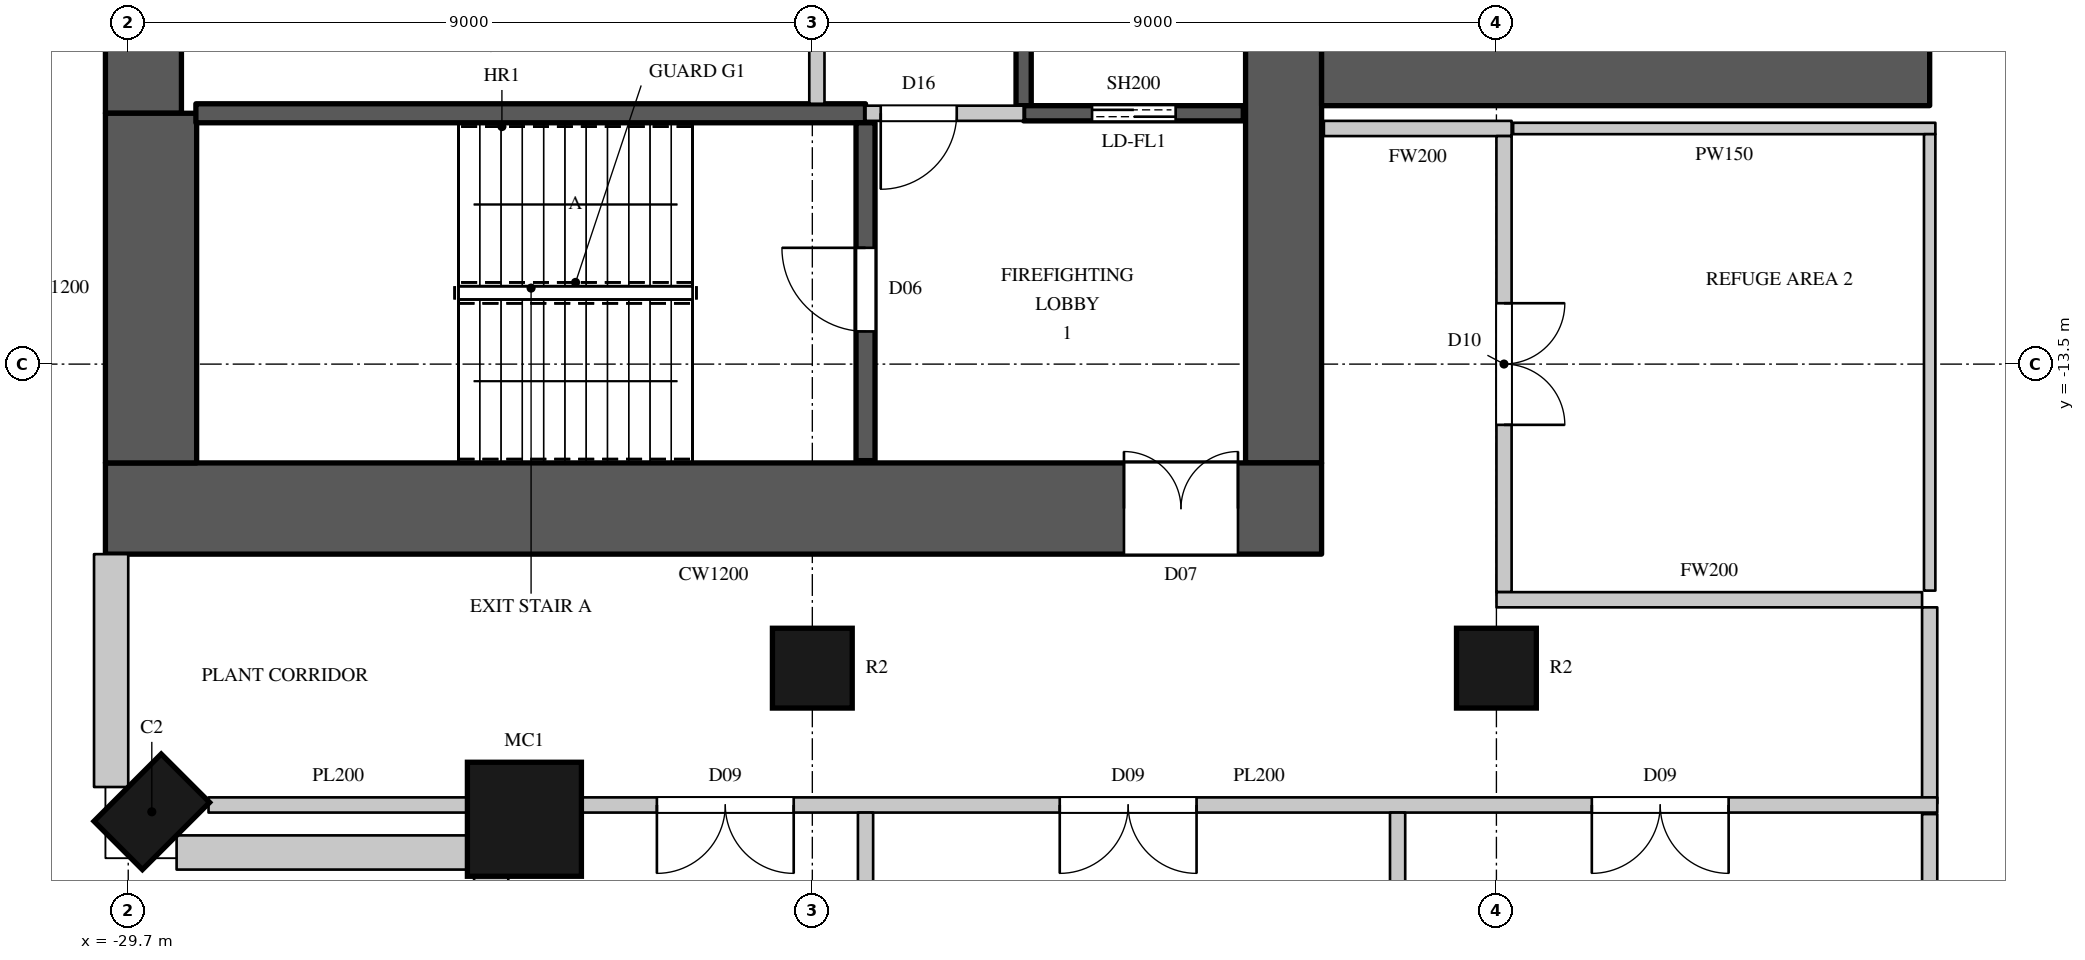
"""IFC4 building model, lengths in metres.
Left out: names, types, materials, properties, quantities, classifications, styles, units other than length and angle.
Written with IfcOpenShell. Run it as: python <this file> out.ifc"""

import sys

from ifc_helpers import new_model, si_unit, direction, frame, frame_2d, origin, origin_2d, place, context, subcontext, project, spatial, rectangle, circle, extrude, element, fill, save


model = new_model("IFC4")
c1 = context("Model", 3, precision=1e-05, world=origin(), true_north=direction((0.0, 1.0)))
c2 = subcontext(c1, "Body", "Model", "MODEL_VIEW")
j1 = project(units=[si_unit("LENGTHUNIT", "METRE"), si_unit("PLANEANGLEUNIT", "RADIAN")], contexts=[c1])
p1 = place(None, origin())
s1 = spatial("IfcSite", under=j1, at=p1, CompositionType="ELEMENT")
p2 = place(p1, origin())
s2 = spatial("IfcBuilding", under=s1, at=p2, CompositionType="ELEMENT")
p3 = place(p2, frame((0.0, 0.0, 152.5)))
s3 = spatial("IfcBuildingStorey", under=s2, at=p3, CompositionType="ELEMENT", Elevation=152.5)
p4 = place(p3, frame((-29.39, -19.39, 0.0), z_axis=(0.0, 0.0, 1.0), x_axis=(0.707106781187, -0.707106781187, 0.0)))
e1 = element("IfcColumn", 1, at=p4, inside=s3, PredefinedType="COLUMN", context=c2, shape_type="SweptSolid", body=[
    extrude(rectangle(XDim=0.9, YDim=1.25, at=origin_2d()), origin(), (0.0, 0.0, 1.0), 8.0),
])
p5 = place(p3, frame((-24.488, -19.488, 0.0), z_axis=(0.0, 0.0, 1.0), x_axis=(1.0, 0.0, 0.0)))
e2 = element("IfcColumn", 2, at=p5, inside=s3, PredefinedType="COLUMN", context=c2, shape_type="SweptSolid", body=[
    extrude(circle(Radius=0.75, at=origin_2d()), origin(), (0.0, 0.0, 1.0), 8.0),
])
for number, where, z_axis, x_axis in (
    (3, (-20.7, -17.5, 0.0), (0.0, 0.0, 1.0), (1.0, 0.0, 0.0)),
    (4, (-11.7, -17.5, 0.0), (0.0, 0.0, 1.0), (1.0, 0.0, 0.0)),
):
    element("IfcColumn", number, at=place(p3, frame(where, z_axis=z_axis, x_axis=x_axis)), inside=s3, PredefinedType="COLUMN", context=c2, shape_type="SweptSolid", body=[
        extrude(circle(Radius=0.525, at=origin_2d()), origin(), (0.0, 0.0, 1.0), 8.0),
    ])
p6 = place(p3, frame((-14.0, -9.6, 0.0), z_axis=(0.0, 0.0, 1.0), x_axis=(1.0, 0.0, 0.0)))
e5 = element("IfcWall", 5, at=p6, inside=s3, PredefinedType="SOLIDWALL", context=c2, shape_type="SweptSolid", body=[
    extrude(rectangle(XDim=8.0, YDim=1.0, at=frame_2d((4.0, 0.0))), origin(), (0.0, 0.0, 1.0), 7.7),
])
p7 = place(p3, frame((-29.925, -16.0, 0.0), z_axis=(0.0, 0.0, 1.0), x_axis=(0.0, -1.0, 0.0)))
e6 = element("IfcWall", 6, at=p7, inside=s3, PredefinedType="SOLIDWALL", context=c2, shape_type="SweptSolid", body=[
    extrude(rectangle(XDim=3.064, YDim=0.45, at=frame_2d((1.532, 0.0))), origin(), (0.0, 0.0, 1.0), 6.4),
])
p8 = place(p3, frame((-29.064, -19.925, 0.0), z_axis=(0.0, 0.0, 1.0), x_axis=(1.0, 0.0, 0.0)))
e7 = element("IfcWall", 7, at=p8, inside=s3, PredefinedType="SOLIDWALL", context=c2, shape_type="SweptSolid", body=[
    extrude(rectangle(XDim=3.857, YDim=0.45, at=frame_2d((1.928, 0.0))), origin(), (0.0, 0.0, 1.0), 7.7),
])
p9 = place(p3, frame((-24.925, -20.207, 0.0), z_axis=(0.0, 0.0, 1.0), x_axis=(0.0, -1.0, 0.0)))
e8 = element("IfcWall", 8, at=p9, inside=s3, PredefinedType="SOLIDWALL", context=c2, shape_type="SweptSolid", body=[
    extrude(rectangle(XDim=1.843, YDim=0.45, at=frame_2d((0.921, 0.0))), origin(), (0.0, 0.0, 1.0), 7.7),
])
p10 = place(p3, frame((-30.0, -15.4, 0.0), z_axis=(0.0, 0.0, 1.0), x_axis=(1.0, 0.0, 0.0)))
e9 = element("IfcWall", 9, at=p10, inside=s3, PredefinedType="SHEAR", context=c2, shape_type="SweptSolid", body=[
    extrude(rectangle(XDim=16.0, YDim=1.2, at=frame_2d((8.0, 0.0))), origin(), (0.0, 0.0, 1.0), 8.0),
])
p11 = place(p10, frame((13.4, 0.0, 0.0)))
e10 = element("IfcOpeningElement", 10, at=p11, cuts=e9, PredefinedType="OPENING", context=c2, shape_type="SweptSolid", body=[
    extrude(rectangle(XDim=1.5, YDim=2.4, at=frame_2d((0.75, 1.2))), frame((0.0, 0.61, 0.0), z_axis=(0.0, -1.0, 0.0), x_axis=(1.0, 0.0, 0.0)), (0.0, 0.0, 1.0), 1.22),
])
p12 = place(p3, frame((-14.5, -14.8, 0.0), z_axis=(0.0, 0.0, 1.0), x_axis=(0.0, 1.0, 0.0)))
e11 = element("IfcWall", 11, at=p12, inside=s3, PredefinedType="SHEAR", context=c2, shape_type="SweptSolid", body=[
    extrude(rectangle(XDim=29.6, YDim=1.0, at=frame_2d((14.8, 0.0))), origin(), (0.0, 0.0, 1.0), 8.0),
])
p13 = place(p12, frame((8.45, 0.0, 0.0)))
e12 = element("IfcOpeningElement", 12, at=p13, cuts=e11, PredefinedType="OPENING", context=c2, shape_type="SweptSolid", body=[
    extrude(rectangle(XDim=1.5, YDim=2.4, at=frame_2d((0.75, 1.2))), frame((0.0, 0.51, 0.0), z_axis=(0.0, -1.0, 0.0), x_axis=(1.0, 0.0, 0.0)), (0.0, 0.0, 1.0), 1.02),
])
p14 = place(p12, frame((19.65, 0.0, 0.0)))
e13 = element("IfcOpeningElement", 13, at=p14, cuts=e11, PredefinedType="OPENING", context=c2, shape_type="SweptSolid", body=[
    extrude(rectangle(XDim=1.5, YDim=2.4, at=frame_2d((0.75, 1.2))), frame((0.0, 0.51, 0.0), z_axis=(0.0, -1.0, 0.0), x_axis=(1.0, 0.0, 0.0)), (0.0, 0.0, 1.0), 1.02),
])
p15 = place(p12, frame((14.5, 0.0, 0.0)))
e14 = element("IfcOpeningElement", 14, at=p15, cuts=e11, PredefinedType="OPENING", context=c2, shape_type="SweptSolid", body=[
    extrude(rectangle(XDim=0.6, YDim=2.0, at=frame_2d((0.3, 1.0))), frame((0.0, 0.51, 0.0), z_axis=(0.0, -1.0, 0.0), x_axis=(1.0, 0.0, 0.0)), (0.0, 0.0, 1.0), 1.02),
])
p16 = place(p3, frame((-29.5, -10.2, 0.0), z_axis=(0.0, 0.0, 1.0), x_axis=(0.0, 1.0, 0.0)))
e15 = element("IfcWall", 15, at=p16, inside=s3, PredefinedType="SHEAR", context=c2, shape_type="SweptSolid", body=[
    extrude(rectangle(XDim=20.4, YDim=1.0, at=frame_2d((10.2, 0.0))), origin(), (0.0, 0.0, 1.0), 8.0),
])
p17 = place(p3, frame((-29.4, -14.8, 0.0), z_axis=(0.0, 0.0, 1.0), x_axis=(0.0, 1.0, 0.0)))
e16 = element("IfcWall", 16, at=p17, inside=s3, PredefinedType="SHEAR", context=c2, shape_type="SweptSolid", body=[
    extrude(rectangle(XDim=4.6, YDim=1.2, at=frame_2d((2.3, 0.0))), origin(), (0.0, 0.0, 1.0), 8.0),
])
p18 = place(p3, frame((-20.0, -10.2, 0.0), z_axis=(0.0, 0.0, 1.0), x_axis=(1.0, 0.0, 0.0)))
e17 = element("IfcWall", 17, at=p18, inside=s3, PredefinedType="PARTITIONING", context=c2, shape_type="SweptSolid", body=[
    extrude(rectangle(XDim=2.08, YDim=0.2, at=frame_2d((1.04, 0.0))), origin(), (0.0, 0.0, 1.0), 7.7),
])
p19 = place(p18, frame((0.2, 0.0, 0.0)))
e18 = element("IfcOpeningElement", 18, at=p19, cuts=e17, PredefinedType="OPENING", context=c2, shape_type="SweptSolid", body=[
    extrude(rectangle(XDim=1.0, YDim=2.2, at=frame_2d((0.5, 1.1))), frame((0.0, 0.11, 0.0), z_axis=(0.0, -1.0, 0.0), x_axis=(1.0, 0.0, 0.0)), (0.0, 0.0, 1.0), 0.22),
])
p20 = place(p3, frame((-13.97, -10.4, 0.0), z_axis=(0.0, 0.0, 1.0), x_axis=(1.0, 0.0, 0.0)))
e19 = element("IfcWall", 19, at=p20, inside=s3, PredefinedType="PARTITIONING", context=c2, shape_type="SweptSolid", body=[
    extrude(rectangle(XDim=2.47, YDim=0.2, at=frame_2d((1.235, 0.0))), origin(), (0.0, 0.0, 1.0), 7.7),
])
p21 = place(p3, frame((-11.6, -16.499, 0.0), z_axis=(0.0, 0.0, 1.0), x_axis=(0.0, 1.0, 0.0)))
e20 = element("IfcWall", 20, at=p21, inside=s3, PredefinedType="PARTITIONING", context=c2, shape_type="SweptSolid", body=[
    extrude(rectangle(XDim=5.999, YDim=0.2, at=frame_2d((3.0, 0.0))), origin(), (0.0, 0.0, 1.0), 6.4),
])
p22 = place(p21, frame((2.2, 0.0, 0.0)))
e21 = element("IfcOpeningElement", 21, at=p22, cuts=e20, PredefinedType="OPENING", context=c2, shape_type="SweptSolid", body=[
    extrude(rectangle(XDim=1.6, YDim=2.4, at=frame_2d((0.8, 1.2))), frame((0.0, 0.11, 0.0), z_axis=(0.0, -1.0, 0.0), x_axis=(1.0, 0.0, 0.0)), (0.0, 0.0, 1.0), 0.22),
])
p23 = place(p3, frame((-11.699, -16.6, 0.0), z_axis=(0.0, 0.0, 1.0), x_axis=(1.0, 0.0, 0.0)))
e22 = element("IfcWall", 22, at=p23, inside=s3, PredefinedType="PARTITIONING", context=c2, shape_type="SweptSolid", body=[
    extrude(rectangle(XDim=5.599, YDim=0.2, at=frame_2d((2.799, 0.0))), origin(), (0.0, 0.0, 1.0), 5.85),
])
p24 = place(p3, frame((-6.0, -19.28, 0.0), z_axis=(0.0, 0.0, 1.0), x_axis=(0.0, 1.0, 0.0)))
e23 = element("IfcWall", 23, at=p24, inside=s3, PredefinedType="PARTITIONING", context=c2, shape_type="SweptSolid", body=[
    extrude(rectangle(XDim=2.58, YDim=0.2, at=frame_2d((1.29, 0.0))), origin(), (0.0, 0.0, 1.0), 7.7),
])
p25 = place(p3, frame((-11.48, -10.4, 0.0), z_axis=(0.0, 0.0, 1.0), x_axis=(1.0, 0.0, 0.0)))
e24 = element("IfcWall", 24, at=p25, inside=s3, PredefinedType="PARTITIONING", context=c2, shape_type="SweptSolid", body=[
    extrude(rectangle(XDim=5.555, YDim=0.15, at=frame_2d((2.777, 0.0))), origin(), (0.0, 0.0, 1.0), 7.7),
])
p26 = place(p3, frame((-6.0, -16.48, 0.0), z_axis=(0.0, 0.0, 1.0), x_axis=(0.0, 1.0, 0.0)))
e25 = element("IfcWall", 25, at=p26, inside=s3, PredefinedType="PARTITIONING", context=c2, shape_type="SweptSolid", body=[
    extrude(rectangle(XDim=6.005, YDim=0.15, at=frame_2d((3.002, 0.0))), origin(), (0.0, 0.0, 1.0), 7.7),
])
p27 = place(p3, frame((-28.644, -19.3, 0.0), z_axis=(0.0, 0.0, 1.0), x_axis=(1.0, 0.0, 0.0)))
e26 = element("IfcWall", 26, at=p27, inside=s3, PredefinedType="PARTITIONING", context=c2, shape_type="SweptSolid", body=[
    extrude(rectangle(XDim=3.413, YDim=0.2, at=frame_2d((1.706, 0.0))), origin(), (0.0, 0.0, 1.0), 7.7),
])
p28 = place(p3, frame((-23.745, -19.3, 0.0), z_axis=(0.0, 0.0, 1.0), x_axis=(1.0, 0.0, 0.0)))
e27 = element("IfcWall", 27, at=p28, inside=s3, PredefinedType="PARTITIONING", context=c2, shape_type="SweptSolid", body=[
    extrude(rectangle(XDim=17.845, YDim=0.2, at=frame_2d((8.922, 0.0))), origin(), (0.0, 0.0, 1.0), 7.25),
])
p29 = place(p28, frame((1.0, 0.0, 0.0)))
e28 = element("IfcOpeningElement", 28, at=p29, cuts=e27, PredefinedType="OPENING", context=c2, shape_type="SweptSolid", body=[
    extrude(rectangle(XDim=1.8, YDim=2.4, at=frame_2d((0.9, 1.2))), frame((0.0, 0.11, 0.0), z_axis=(0.0, -1.0, 0.0), x_axis=(1.0, 0.0, 0.0)), (0.0, 0.0, 1.0), 0.22),
])
p30 = place(p28, frame((6.3, 0.0, 0.0)))
e29 = element("IfcOpeningElement", 29, at=p30, cuts=e27, PredefinedType="OPENING", context=c2, shape_type="SweptSolid", body=[
    extrude(rectangle(XDim=1.8, YDim=2.4, at=frame_2d((0.9, 1.2))), frame((0.0, 0.11, 0.0), z_axis=(0.0, -1.0, 0.0), x_axis=(1.0, 0.0, 0.0)), (0.0, 0.0, 1.0), 0.22),
])
p31 = place(p28, frame((13.3, 0.0, 0.0)))
e30 = element("IfcOpeningElement", 30, at=p31, cuts=e27, PredefinedType="OPENING", context=c2, shape_type="SweptSolid", body=[
    extrude(rectangle(XDim=1.8, YDim=2.4, at=frame_2d((0.9, 1.2))), frame((0.0, 0.11, 0.0), z_axis=(0.0, -1.0, 0.0), x_axis=(1.0, 0.0, 0.0)), (0.0, 0.0, 1.0), 0.22),
])
p32 = place(p3, frame((-20.64, -10.075, 0.0), z_axis=(0.0, 0.0, 1.0), x_axis=(0.0, 1.0, 0.0)))
e31 = element("IfcWall", 31, at=p32, inside=s3, PredefinedType="PARTITIONING", context=c2, shape_type="SweptSolid", body=[
    extrude(rectangle(XDim=2.575, YDim=0.2, at=frame_2d((1.288, 0.0))), origin(), (0.0, 0.0, 1.0), 7.7),
])
for number, where, z_axis, x_axis in (
    (32, (-20.0, -25.7, 0.0), (0.0, 0.0, 1.0), (0.0, 1.0, 0.0)),
    (33, (-13.0, -25.7, 0.0), (0.0, 0.0, 1.0), (0.0, 1.0, 0.0)),
):
    element("IfcWall", number, at=place(p3, frame(where, z_axis=z_axis, x_axis=x_axis)), inside=s3, PredefinedType="PARTITIONING", context=c2, shape_type="SweptSolid", body=[
        extrude(rectangle(XDim=6.3, YDim=0.2, at=frame_2d((3.15, 0.0))), origin(), (0.0, 0.0, 1.0), 7.7),
    ])
p33 = place(p3, frame((-6.0, -25.7, 0.0), z_axis=(0.0, 0.0, 1.0), x_axis=(0.0, 1.0, 0.0)))
e34 = element("IfcWall", 34, at=p33, inside=s3, PredefinedType="PARTITIONING", context=c2, shape_type="SweptSolid", body=[
    extrude(rectangle(XDim=6.28, YDim=0.2, at=frame_2d((3.14, 0.0))), origin(), (0.0, 0.0, 1.0), 7.7),
])
p34 = place(p3, frame((-17.92, -10.1, 0.0), z_axis=(0.0, 0.0, 1.0), x_axis=(0.0, 1.0, 0.0)))
e35 = element("IfcWall", 35, at=p34, inside=s3, PredefinedType="SHEAR", context=c2, shape_type="SweptSolid", body=[
    extrude(rectangle(XDim=2.6, YDim=0.2, at=frame_2d((1.3, 0.0))), origin(), (0.0, 0.0, 1.0), 7.7),
])
p35 = place(p3, frame((-17.92, -10.2, 0.0), z_axis=(0.0, 0.0, 1.0), x_axis=(1.0, 0.0, 0.0)))
e36 = element("IfcWall", 36, at=p35, inside=s3, PredefinedType="SHEAR", context=c2, shape_type="SweptSolid", body=[
    extrude(rectangle(XDim=2.89, YDim=0.2, at=frame_2d((1.445, 0.0))), origin(), (0.0, 0.0, 1.0), 7.7),
])
p36 = place(p35, frame((0.9, 0.0, 0.0)))
e37 = element("IfcOpeningElement", 37, at=p36, cuts=e36, PredefinedType="OPENING", context=c2, shape_type="SweptSolid", body=[
    extrude(rectangle(XDim=1.1, YDim=2.2, at=frame_2d((0.55, 1.1))), frame((0.0, 0.11, 0.0), z_axis=(0.0, -1.0, 0.0), x_axis=(1.0, 0.0, 0.0)), (0.0, 0.0, 1.0), 0.22),
])
p37 = place(p3, frame((-28.81, -10.2, 0.0), z_axis=(0.0, 0.0, 1.0), x_axis=(1.0, 0.0, 0.0)))
e38 = element("IfcWall", 38, at=p37, inside=s3, PredefinedType="SHEAR", context=c2, shape_type="SweptSolid", body=[
    extrude(rectangle(XDim=8.81, YDim=0.25, at=frame_2d((4.405, 0.0))), origin(), (0.0, 0.0, 1.0), 7.7),
])
p38 = place(p3, frame((-20.0, -14.77, 0.0), z_axis=(0.0, 0.0, 1.0), x_axis=(0.0, 1.0, 0.0)))
e39 = element("IfcWall", 39, at=p38, inside=s3, PredefinedType="SHEAR", context=c2, shape_type="SweptSolid", body=[
    extrude(rectangle(XDim=4.445, YDim=0.25, at=frame_2d((2.223, 0.0))), origin(), (0.0, 0.0, 1.0), 7.7),
])
p39 = place(p38, frame((1.7, 0.0, 0.0)))
e40 = element("IfcOpeningElement", 40, at=p39, cuts=e39, PredefinedType="OPENING", context=c2, shape_type="SweptSolid", body=[
    extrude(rectangle(XDim=1.1, YDim=2.2, at=frame_2d((0.55, 1.1))), frame((0.0, 0.135, 0.0), z_axis=(0.0, -1.0, 0.0), x_axis=(1.0, 0.0, 0.0)), (0.0, 0.0, 1.0), 0.27),
])
p40 = place(p39, origin())
e41 = element("IfcDoor", 41, at=p40, inside=s3, OperationType="SINGLE_SWING_RIGHT", PredefinedType="DOOR", context=c2, shape_type="SweptSolid", body=[
    extrude(rectangle(XDim=1.1, YDim=2.2, at=frame_2d((0.55, 1.1))), frame((0.0, 0.025, 0.0), z_axis=(0.0, -1.0, 0.0), x_axis=(1.0, 0.0, 0.0)), (0.0, 0.0, 1.0), 0.05),
])
fill(e40, e41)
p41 = place(p19, origin())
e42 = element("IfcDoor", 42, at=p41, inside=s3, OperationType="SINGLE_SWING_RIGHT", PredefinedType="DOOR", context=c2, shape_type="SweptSolid", body=[
    extrude(rectangle(XDim=1.0, YDim=2.2, at=frame_2d((0.5, 1.1))), frame((0.0, 0.025, 0.0), z_axis=(0.0, -1.0, 0.0), x_axis=(1.0, 0.0, 0.0)), (0.0, 0.0, 1.0), 0.05),
])
fill(e18, e42)
p42 = place(p36, origin())
e43 = element("IfcDoor", 43, at=p42, inside=s3, OperationType="DOUBLE_DOOR_SLIDING", PredefinedType="DOOR", context=c2, shape_type="SweptSolid", body=[
    extrude(rectangle(XDim=1.1, YDim=2.2, at=frame_2d((0.55, 1.1))), frame((0.0, 0.025, 0.0), z_axis=(0.0, -1.0, 0.0), x_axis=(1.0, 0.0, 0.0)), (0.0, 0.0, 1.0), 0.05),
])
fill(e37, e43)
p43 = place(p29, origin())
e44 = element("IfcDoor", 44, at=p43, inside=s3, OperationType="DOUBLE_DOOR_SINGLE_SWING", PredefinedType="DOOR", context=c2, shape_type="SweptSolid", body=[
    extrude(rectangle(XDim=1.8, YDim=2.4, at=frame_2d((0.9, 1.2))), frame((0.0, 0.025, 0.0), z_axis=(0.0, -1.0, 0.0), x_axis=(1.0, 0.0, 0.0)), (0.0, 0.0, 1.0), 0.05),
])
fill(e28, e44)
p44 = place(p30, origin())
e45 = element("IfcDoor", 45, at=p44, inside=s3, OperationType="DOUBLE_DOOR_SINGLE_SWING", PredefinedType="DOOR", context=c2, shape_type="SweptSolid", body=[
    extrude(rectangle(XDim=1.8, YDim=2.4, at=frame_2d((0.9, 1.2))), frame((0.0, 0.025, 0.0), z_axis=(0.0, -1.0, 0.0), x_axis=(1.0, 0.0, 0.0)), (0.0, 0.0, 1.0), 0.05),
])
fill(e29, e45)
p45 = place(p31, origin())
e46 = element("IfcDoor", 46, at=p45, inside=s3, OperationType="DOUBLE_DOOR_SINGLE_SWING", PredefinedType="DOOR", context=c2, shape_type="SweptSolid", body=[
    extrude(rectangle(XDim=1.8, YDim=2.4, at=frame_2d((0.9, 1.2))), frame((0.0, 0.025, 0.0), z_axis=(0.0, -1.0, 0.0), x_axis=(1.0, 0.0, 0.0)), (0.0, 0.0, 1.0), 0.05),
])
fill(e30, e46)
p46 = place(p22, origin())
e47 = element("IfcDoor", 47, at=p46, inside=s3, OperationType="DOUBLE_DOOR_SINGLE_SWING", PredefinedType="DOOR", context=c2, shape_type="SweptSolid", body=[
    extrude(rectangle(XDim=1.6, YDim=2.4, at=frame_2d((0.8, 1.2))), frame((0.0, 0.025, 0.0), z_axis=(0.0, -1.0, 0.0), x_axis=(1.0, 0.0, 0.0)), (0.0, 0.0, 1.0), 0.05),
])
fill(e21, e47)
p47 = place(p11, origin())
e48 = element("IfcDoor", 48, at=p47, inside=s3, OperationType="DOUBLE_DOOR_SINGLE_SWING", PredefinedType="DOOR", context=c2, shape_type="SweptSolid", body=[
    extrude(rectangle(XDim=1.5, YDim=2.4, at=frame_2d((0.75, 1.2))), frame((0.0, 0.025, 0.0), z_axis=(0.0, -1.0, 0.0), x_axis=(1.0, 0.0, 0.0)), (0.0, 0.0, 1.0), 0.05),
])
fill(e10, e48)
save(model, sys.argv[1])
